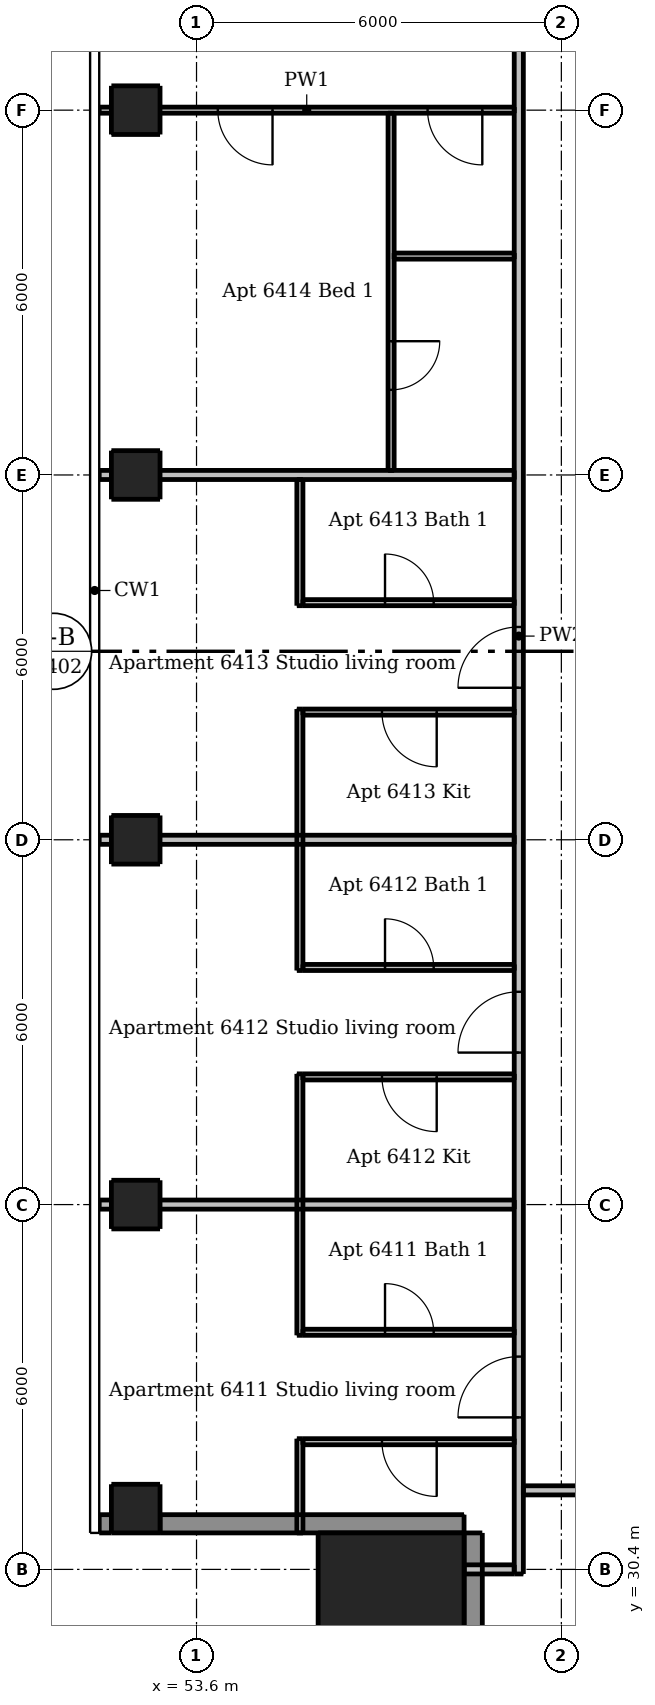
"""IFC4 building model, lengths in metres.
Left out: names, types, materials, properties, quantities, classifications, styles, units other than length and angle.
Written with IfcOpenShell. Run it as: python <this file> out.ifc"""

import sys

from ifc_helpers import new_model, si_unit, direction, frame, frame_2d, origin, origin_2d, place, context, subcontext, project, spatial, rectangle, extrude, element, fill, save


model = new_model("IFC4")
c1 = context("Model", 3, precision=1e-05, world=origin(), true_north=direction((0.0, 1.0)))
c2 = subcontext(c1, "Body", "Model", "MODEL_VIEW")
j1 = project(units=[si_unit("LENGTHUNIT", "METRE"), si_unit("PLANEANGLEUNIT", "RADIAN")], contexts=[c1])
p1 = place(None, origin())
s1 = spatial("IfcSite", under=j1, at=p1, CompositionType="ELEMENT")
p2 = place(p1, origin())
s2 = spatial("IfcBuilding", under=s1, at=p2, CompositionType="ELEMENT")
p3 = place(p2, frame((0.0, 0.0, 242.2)))
s3 = spatial("IfcBuildingStorey", under=s2, at=p3, CompositionType="ELEMENT", Elevation=242.2)
for number, where, z_axis, x_axis in (
    (1, (52.6, 31.4, 0.0), (0.0, 0.0, 1.0), (1.0, 0.0, 0.0)),
    (2, (52.6, 36.4, 0.0), (0.0, 0.0, 1.0), (1.0, 0.0, 0.0)),
    (3, (52.6, 42.4, 0.0), (0.0, 0.0, 1.0), (1.0, 0.0, 0.0)),
    (4, (52.6, 48.4, 0.0), (0.0, 0.0, 1.0), (1.0, 0.0, 0.0)),
    (5, (52.6, 54.4, 0.0), (0.0, 0.0, 1.0), (1.0, 0.0, 0.0)),
):
    element("IfcColumn", number, at=place(p3, frame(where, z_axis=z_axis, x_axis=x_axis)), inside=s3, PredefinedType="COLUMN", context=c2, shape_type="SweptSolid", body=[
        extrude(rectangle(XDim=0.8, YDim=0.8, at=origin_2d()), origin(), (0.0, 0.0, 1.0), 3.05),
    ])
p4 = place(p3, frame((56.8, 29.8, 0.0), z_axis=(0.0, 0.0, 1.0), x_axis=(1.0, 0.0, 0.0)))
e6 = element("IfcColumn", 6, at=p4, inside=s3, PredefinedType="COLUMN", context=c2, shape_type="SweptSolid", body=[
    extrude(rectangle(XDim=2.4, YDim=2.4, at=origin_2d()), origin(), (0.0, 0.0, 1.0), 3.3),
])
p5 = place(p3, frame((52.0, 31.15, 0.0), z_axis=(0.0, 0.0, 1.0), x_axis=(1.0, 0.0, 0.0)))
e7 = element("IfcWall", 7, at=p5, inside=s3, PredefinedType="SOLIDWALL", context=c2, shape_type="SweptSolid", body=[
    extrude(rectangle(XDim=0.2, YDim=0.3, at=frame_2d((0.1, 0.0))), origin(), (0.0, 0.0, 1.0), 3.05),
])
p6 = place(p3, frame((53.0, 31.15, 0.0), z_axis=(0.0, 0.0, 1.0), x_axis=(1.0, 0.0, 0.0)))
e8 = element("IfcWall", 8, at=p6, inside=s3, PredefinedType="SOLIDWALL", context=c2, shape_type="SweptSolid", body=[
    extrude(rectangle(XDim=5.0, YDim=0.3, at=frame_2d((2.5, 0.0))), origin(), (0.0, 0.0, 1.0), 3.05),
])
p7 = place(p3, frame((58.15, 31.0, 0.0), z_axis=(0.0, 0.0, 1.0), x_axis=(0.0, -1.0, 0.0)))
e9 = element("IfcWall", 9, at=p7, inside=s3, PredefinedType="SOLIDWALL", context=c2, shape_type="SweptSolid", body=[
    extrude(rectangle(XDim=6.0, YDim=0.3, at=frame_2d((3.0, 0.0))), origin(), (0.0, 0.0, 1.0), 3.05),
])
p8 = place(p7, frame((1.8, 0.0, 0.15)))
e10 = element("IfcOpeningElement", 10, at=p8, cuts=e9, PredefinedType="OPENING", context=c2, shape_type="SweptSolid", body=[
    extrude(rectangle(XDim=2.4, YDim=2.1, at=frame_2d((1.2, 1.05))), frame((0.0, 0.16, 0.0), z_axis=(0.0, -1.0, 0.0), x_axis=(1.0, 0.0, 0.0)), (0.0, 0.0, 1.0), 0.32),
])
p9 = place(p3, frame((55.3, 31.0, 0.0), z_axis=(0.0, 0.0, 1.0), x_axis=(0.0, 1.0, 0.0)))
e11 = element("IfcWall", 11, at=p9, inside=s3, PredefinedType="PARTITIONING", context=c2, shape_type="SweptSolid", body=[
    extrude(rectangle(XDim=1.55, YDim=0.1, at=frame_2d((0.775, 0.0))), origin(), (0.0, 0.0, 1.0), 3.05),
])
for number, where, z_axis, x_axis in (
    (12, (55.3, 34.25, 0.0), (0.0, 0.0, 1.0), (0.0, 1.0, 0.0)),
    (13, (55.3, 40.25, 0.0), (0.0, 0.0, 1.0), (0.0, 1.0, 0.0)),
):
    element("IfcWall", number, at=place(p3, frame(where, z_axis=z_axis, x_axis=x_axis)), inside=s3, PredefinedType="PARTITIONING", context=c2, shape_type="SweptSolid", body=[
        extrude(rectangle(XDim=4.3, YDim=0.1, at=frame_2d((2.15, 0.0))), origin(), (0.0, 0.0, 1.0), 3.05),
    ])
p10 = place(p3, frame((55.3, 46.25, 0.0), z_axis=(0.0, 0.0, 1.0), x_axis=(0.0, 1.0, 0.0)))
e14 = element("IfcWall", 14, at=p10, inside=s3, PredefinedType="PARTITIONING", context=c2, shape_type="SweptSolid", body=[
    extrude(rectangle(XDim=2.075, YDim=0.1, at=frame_2d((1.038, 0.0))), origin(), (0.0, 0.0, 1.0), 3.05),
])
p11 = place(p3, frame((56.8, 54.35, 0.0), z_axis=(0.0, 0.0, 1.0), x_axis=(0.0, -1.0, 0.0)))
e15 = element("IfcWall", 15, at=p11, inside=s3, PredefinedType="PARTITIONING", context=c2, shape_type="SweptSolid", body=[
    extrude(rectangle(XDim=5.875, YDim=0.1, at=frame_2d((2.938, 0.0))), origin(), (0.0, 0.0, 1.0), 3.05),
])
p12 = place(p11, frame((3.75, 0.0, 0.0)))
e16 = element("IfcOpeningElement", 16, at=p12, cuts=e15, PredefinedType="OPENING", context=c2, shape_type="SweptSolid", body=[
    extrude(rectangle(XDim=0.8, YDim=2.1, at=frame_2d((0.4, 1.05))), frame((0.0, 0.06, 0.0), z_axis=(0.0, -1.0, 0.0), x_axis=(1.0, 0.0, 0.0)), (0.0, 0.0, 1.0), 0.12),
])
p13 = place(p3, frame((58.825, 54.4, 0.0), z_axis=(0.0, 0.0, 1.0), x_axis=(-1.0, 0.0, 0.0)))
e17 = element("IfcWall", 17, at=p13, inside=s3, PredefinedType="PARTITIONING", context=c2, shape_type="SweptSolid", body=[
    extrude(rectangle(XDim=6.825, YDim=0.1, at=frame_2d((3.413, 0.0))), origin(), (0.0, 0.0, 1.0), 2.516),
])
p14 = place(p13, frame((0.525, 0.0, 0.0)))
e18 = element("IfcOpeningElement", 18, at=p14, cuts=e17, PredefinedType="OPENING", context=c2, shape_type="SweptSolid", body=[
    extrude(rectangle(XDim=0.9, YDim=2.1, at=frame_2d((0.45, 1.05))), frame((0.0, 0.06, 0.0), z_axis=(0.0, -1.0, 0.0), x_axis=(1.0, 0.0, 0.0)), (0.0, 0.0, 1.0), 0.12),
])
p15 = place(p13, frame((3.975, 0.0, 0.0)))
e19 = element("IfcOpeningElement", 19, at=p15, cuts=e17, PredefinedType="OPENING", context=c2, shape_type="SweptSolid", body=[
    extrude(rectangle(XDim=0.9, YDim=2.1, at=frame_2d((0.45, 1.05))), frame((0.0, 0.06, 0.0), z_axis=(0.0, -1.0, 0.0), x_axis=(1.0, 0.0, 0.0)), (0.0, 0.0, 1.0), 0.12),
])
p16 = place(p3, frame((56.85, 52.0, 0.0), z_axis=(0.0, 0.0, 1.0), x_axis=(1.0, 0.0, 0.0)))
e20 = element("IfcWall", 20, at=p16, inside=s3, PredefinedType="PARTITIONING", context=c2, shape_type="SweptSolid", body=[
    extrude(rectangle(XDim=1.975, YDim=0.1, at=frame_2d((0.987, 0.0))), origin(), (0.0, 0.0, 1.0), 3.05),
])
p17 = place(p3, frame((55.35, 46.3, 0.0), z_axis=(0.0, 0.0, 1.0), x_axis=(1.0, 0.0, 0.0)))
e21 = element("IfcWall", 21, at=p17, inside=s3, PredefinedType="PARTITIONING", context=c2, shape_type="SweptSolid", body=[
    extrude(rectangle(XDim=3.475, YDim=0.1, at=frame_2d((1.737, 0.0))), origin(), (0.0, 0.0, 1.0), 3.05),
])
p18 = place(p17, frame((1.35, 0.0, 0.0)))
e22 = element("IfcOpeningElement", 22, at=p18, cuts=e21, PredefinedType="OPENING", context=c2, shape_type="SweptSolid", body=[
    extrude(rectangle(XDim=0.8, YDim=2.1, at=frame_2d((0.4, 1.05))), frame((0.0, 0.06, 0.0), z_axis=(0.0, -1.0, 0.0), x_axis=(1.0, 0.0, 0.0)), (0.0, 0.0, 1.0), 0.12),
])
p19 = place(p3, frame((58.825, 44.5, 0.0), z_axis=(0.0, 0.0, 1.0), x_axis=(-1.0, 0.0, 0.0)))
e23 = element("IfcWall", 23, at=p19, inside=s3, PredefinedType="PARTITIONING", context=c2, shape_type="SweptSolid", body=[
    extrude(rectangle(XDim=3.475, YDim=0.1, at=frame_2d((1.737, 0.0))), origin(), (0.0, 0.0, 1.0), 3.05),
])
p20 = place(p19, frame((1.275, 0.0, 0.0)))
e24 = element("IfcOpeningElement", 24, at=p20, cuts=e23, PredefinedType="OPENING", context=c2, shape_type="SweptSolid", body=[
    extrude(rectangle(XDim=0.9, YDim=2.1, at=frame_2d((0.45, 1.05))), frame((0.0, 0.06, 0.0), z_axis=(0.0, -1.0, 0.0), x_axis=(1.0, 0.0, 0.0)), (0.0, 0.0, 1.0), 0.12),
])
p21 = place(p3, frame((55.35, 40.3, 0.0), z_axis=(0.0, 0.0, 1.0), x_axis=(1.0, 0.0, 0.0)))
e25 = element("IfcWall", 25, at=p21, inside=s3, PredefinedType="PARTITIONING", context=c2, shape_type="SweptSolid", body=[
    extrude(rectangle(XDim=3.475, YDim=0.1, at=frame_2d((1.737, 0.0))), origin(), (0.0, 0.0, 1.0), 3.05),
])
p22 = place(p21, frame((1.35, 0.0, 0.0)))
e26 = element("IfcOpeningElement", 26, at=p22, cuts=e25, PredefinedType="OPENING", context=c2, shape_type="SweptSolid", body=[
    extrude(rectangle(XDim=0.8, YDim=2.1, at=frame_2d((0.4, 1.05))), frame((0.0, 0.06, 0.0), z_axis=(0.0, -1.0, 0.0), x_axis=(1.0, 0.0, 0.0)), (0.0, 0.0, 1.0), 0.12),
])
p23 = place(p3, frame((58.825, 38.5, 0.0), z_axis=(0.0, 0.0, 1.0), x_axis=(-1.0, 0.0, 0.0)))
e27 = element("IfcWall", 27, at=p23, inside=s3, PredefinedType="PARTITIONING", context=c2, shape_type="SweptSolid", body=[
    extrude(rectangle(XDim=3.475, YDim=0.1, at=frame_2d((1.737, 0.0))), origin(), (0.0, 0.0, 1.0), 3.05),
])
p24 = place(p23, frame((1.275, 0.0, 0.0)))
e28 = element("IfcOpeningElement", 28, at=p24, cuts=e27, PredefinedType="OPENING", context=c2, shape_type="SweptSolid", body=[
    extrude(rectangle(XDim=0.9, YDim=2.1, at=frame_2d((0.45, 1.05))), frame((0.0, 0.06, 0.0), z_axis=(0.0, -1.0, 0.0), x_axis=(1.0, 0.0, 0.0)), (0.0, 0.0, 1.0), 0.12),
])
p25 = place(p3, frame((55.35, 34.3, 0.0), z_axis=(0.0, 0.0, 1.0), x_axis=(1.0, 0.0, 0.0)))
e29 = element("IfcWall", 29, at=p25, inside=s3, PredefinedType="PARTITIONING", context=c2, shape_type="SweptSolid", body=[
    extrude(rectangle(XDim=3.475, YDim=0.1, at=frame_2d((1.737, 0.0))), origin(), (0.0, 0.0, 1.0), 3.05),
])
p26 = place(p25, frame((1.35, 0.0, 0.0)))
e30 = element("IfcOpeningElement", 30, at=p26, cuts=e29, PredefinedType="OPENING", context=c2, shape_type="SweptSolid", body=[
    extrude(rectangle(XDim=0.8, YDim=2.1, at=frame_2d((0.4, 1.05))), frame((0.0, 0.06, 0.0), z_axis=(0.0, -1.0, 0.0), x_axis=(1.0, 0.0, 0.0)), (0.0, 0.0, 1.0), 0.12),
])
p27 = place(p3, frame((58.825, 32.5, 0.0), z_axis=(0.0, 0.0, 1.0), x_axis=(-1.0, 0.0, 0.0)))
e31 = element("IfcWall", 31, at=p27, inside=s3, PredefinedType="PARTITIONING", context=c2, shape_type="SweptSolid", body=[
    extrude(rectangle(XDim=3.475, YDim=0.1, at=frame_2d((1.737, 0.0))), origin(), (0.0, 0.0, 1.0), 3.05),
])
p28 = place(p27, frame((1.275, 0.0, 0.0)))
e32 = element("IfcOpeningElement", 32, at=p28, cuts=e31, PredefinedType="OPENING", context=c2, shape_type="SweptSolid", body=[
    extrude(rectangle(XDim=0.9, YDim=2.1, at=frame_2d((0.45, 1.05))), frame((0.0, 0.06, 0.0), z_axis=(0.0, -1.0, 0.0), x_axis=(1.0, 0.0, 0.0)), (0.0, 0.0, 1.0), 0.12),
])
p29 = place(p3, frame((58.9, 30.325, 0.0), z_axis=(0.0, 0.0, 1.0), x_axis=(0.0, 1.0, 0.0)))
e33 = element("IfcWall", 33, at=p29, inside=s3, PredefinedType="PARTITIONING", context=c2, shape_type="SweptSolid", body=[
    extrude(rectangle(XDim=30.85, YDim=0.15, at=frame_2d((15.425, 0.0))), origin(), (0.0, 0.0, 1.0), 3.05),
])
p30 = place(p29, frame((2.575, 0.0, 0.0)))
e34 = element("IfcOpeningElement", 34, at=p30, cuts=e33, PredefinedType="OPENING", context=c2, shape_type="SweptSolid", body=[
    extrude(rectangle(XDim=1.0, YDim=2.1, at=frame_2d((0.5, 1.05))), frame((0.0, 0.085, 0.0), z_axis=(0.0, -1.0, 0.0), x_axis=(1.0, 0.0, 0.0)), (0.0, 0.0, 1.0), 0.17),
])
p31 = place(p29, frame((8.575, 0.0, 0.0)))
e35 = element("IfcOpeningElement", 35, at=p31, cuts=e33, PredefinedType="OPENING", context=c2, shape_type="SweptSolid", body=[
    extrude(rectangle(XDim=1.0, YDim=2.1, at=frame_2d((0.5, 1.05))), frame((0.0, 0.085, 0.0), z_axis=(0.0, -1.0, 0.0), x_axis=(1.0, 0.0, 0.0)), (0.0, 0.0, 1.0), 0.17),
])
p32 = place(p29, frame((14.575, 0.0, 0.0)))
e36 = element("IfcOpeningElement", 36, at=p32, cuts=e33, PredefinedType="OPENING", context=c2, shape_type="SweptSolid", body=[
    extrude(rectangle(XDim=1.0, YDim=2.1, at=frame_2d((0.5, 1.05))), frame((0.0, 0.085, 0.0), z_axis=(0.0, -1.0, 0.0), x_axis=(1.0, 0.0, 0.0)), (0.0, 0.0, 1.0), 0.17),
])
p33 = place(p29, frame((26.925, 0.0, 0.0)))
e37 = element("IfcOpeningElement", 37, at=p33, cuts=e33, PredefinedType="OPENING", context=c2, shape_type="SweptSolid", body=[
    extrude(rectangle(XDim=1.0, YDim=2.1, at=frame_2d((0.5, 1.05))), frame((0.0, 0.085, 0.0), z_axis=(0.0, -1.0, 0.0), x_axis=(1.0, 0.0, 0.0)), (0.0, 0.0, 1.0), 0.17),
])
for number, where, z_axis, x_axis in (
    (38, (52.0, 48.4, 0.0), (0.0, 0.0, 1.0), (1.0, 0.0, 0.0)),
    (39, (52.0, 42.4, 0.0), (0.0, 0.0, 1.0), (1.0, 0.0, 0.0)),
    (40, (52.0, 36.4, 0.0), (0.0, 0.0, 1.0), (1.0, 0.0, 0.0)),
):
    element("IfcWall", number, at=place(p3, frame(where, z_axis=z_axis, x_axis=x_axis)), inside=s3, PredefinedType="PARTITIONING", context=c2, shape_type="SweptSolid", body=[
        extrude(rectangle(XDim=6.825, YDim=0.15, at=frame_2d((3.413, 0.0))), origin(), (0.0, 0.0, 1.0), 2.516),
    ])
p34 = place(p3, frame((89.525, 31.7, 0.0), z_axis=(0.0, 0.0, 1.0), x_axis=(-1.0, 0.0, 0.0)))
e41 = element("IfcWall", 41, at=p34, inside=s3, PredefinedType="PARTITIONING", context=c2, shape_type="SweptSolid", body=[
    extrude(rectangle(XDim=30.55, YDim=0.15, at=frame_2d((15.275, 0.0))), origin(), (0.0, 0.0, 1.0), 3.05),
])
p35 = place(p34, frame((26.775, 0.0, 0.0)))
e42 = element("IfcOpeningElement", 42, at=p35, cuts=e41, PredefinedType="OPENING", context=c2, shape_type="SweptSolid", body=[
    extrude(rectangle(XDim=1.0, YDim=2.1, at=frame_2d((0.5, 1.05))), frame((0.0, 0.085, 0.0), z_axis=(0.0, -1.0, 0.0), x_axis=(1.0, 0.0, 0.0)), (0.0, 0.0, 1.0), 0.17),
])
p36 = place(p34, frame((14.425, 0.0, 0.0)))
e43 = element("IfcOpeningElement", 43, at=p36, cuts=e41, PredefinedType="OPENING", context=c2, shape_type="SweptSolid", body=[
    extrude(rectangle(XDim=1.0, YDim=2.1, at=frame_2d((0.5, 1.05))), frame((0.0, 0.085, 0.0), z_axis=(0.0, -1.0, 0.0), x_axis=(1.0, 0.0, 0.0)), (0.0, 0.0, 1.0), 0.17),
])
p37 = place(p34, frame((6.962, 0.0, 0.0)))
e44 = element("IfcOpeningElement", 44, at=p37, cuts=e41, PredefinedType="OPENING", context=c2, shape_type="SweptSolid", body=[
    extrude(rectangle(XDim=1.0, YDim=2.1, at=frame_2d((0.5, 1.05))), frame((0.0, 0.085, 0.0), z_axis=(0.0, -1.0, 0.0), x_axis=(1.0, 0.0, 0.0)), (0.0, 0.0, 1.0), 0.17),
])
p38 = place(p3, frame((58.0, 30.4, 0.0), z_axis=(0.0, 0.0, 1.0), x_axis=(1.0, 0.0, 0.0)))
e45 = element("IfcWall", 45, at=p38, inside=s3, PredefinedType="PARTITIONING", context=c2, shape_type="SweptSolid", body=[
    extrude(rectangle(XDim=0.825, YDim=0.15, at=frame_2d((0.413, 0.0))), origin(), (0.0, 0.0, 1.0), 3.05),
])
p39 = place(p30, origin())
e46 = element("IfcDoor", 46, at=p39, inside=s3, OperationType="SINGLE_SWING_LEFT", PredefinedType="DOOR", context=c2, shape_type="SweptSolid", body=[
    extrude(rectangle(XDim=1.0, YDim=2.1, at=frame_2d((0.5, 1.05))), frame((0.0, 0.025, 0.0), z_axis=(0.0, -1.0, 0.0), x_axis=(1.0, 0.0, 0.0)), (0.0, 0.0, 1.0), 0.05),
])
fill(e34, e46)
p40 = place(p28, origin())
e47 = element("IfcDoor", 47, at=p40, inside=s3, OperationType="SINGLE_SWING_LEFT", PredefinedType="DOOR", context=c2, shape_type="SweptSolid", body=[
    extrude(rectangle(XDim=0.9, YDim=2.1, at=frame_2d((0.45, 1.05))), frame((0.0, 0.025, 0.0), z_axis=(0.0, -1.0, 0.0), x_axis=(1.0, 0.0, 0.0)), (0.0, 0.0, 1.0), 0.05),
])
fill(e32, e47)
p41 = place(p26, origin())
e48 = element("IfcDoor", 48, at=p41, inside=s3, OperationType="SINGLE_SWING_LEFT", PredefinedType="DOOR", context=c2, shape_type="SweptSolid", body=[
    extrude(rectangle(XDim=0.8, YDim=2.1, at=frame_2d((0.4, 1.05))), frame((0.0, 0.025, 0.0), z_axis=(0.0, -1.0, 0.0), x_axis=(1.0, 0.0, 0.0)), (0.0, 0.0, 1.0), 0.05),
])
fill(e30, e48)
p42 = place(p31, origin())
e49 = element("IfcDoor", 49, at=p42, inside=s3, OperationType="SINGLE_SWING_LEFT", PredefinedType="DOOR", context=c2, shape_type="SweptSolid", body=[
    extrude(rectangle(XDim=1.0, YDim=2.1, at=frame_2d((0.5, 1.05))), frame((0.0, 0.025, 0.0), z_axis=(0.0, -1.0, 0.0), x_axis=(1.0, 0.0, 0.0)), (0.0, 0.0, 1.0), 0.05),
])
fill(e35, e49)
p43 = place(p24, origin())
e50 = element("IfcDoor", 50, at=p43, inside=s3, OperationType="SINGLE_SWING_LEFT", PredefinedType="DOOR", context=c2, shape_type="SweptSolid", body=[
    extrude(rectangle(XDim=0.9, YDim=2.1, at=frame_2d((0.45, 1.05))), frame((0.0, 0.025, 0.0), z_axis=(0.0, -1.0, 0.0), x_axis=(1.0, 0.0, 0.0)), (0.0, 0.0, 1.0), 0.05),
])
fill(e28, e50)
p44 = place(p22, origin())
e51 = element("IfcDoor", 51, at=p44, inside=s3, OperationType="SINGLE_SWING_LEFT", PredefinedType="DOOR", context=c2, shape_type="SweptSolid", body=[
    extrude(rectangle(XDim=0.8, YDim=2.1, at=frame_2d((0.4, 1.05))), frame((0.0, 0.025, 0.0), z_axis=(0.0, -1.0, 0.0), x_axis=(1.0, 0.0, 0.0)), (0.0, 0.0, 1.0), 0.05),
])
fill(e26, e51)
p45 = place(p32, origin())
e52 = element("IfcDoor", 52, at=p45, inside=s3, OperationType="SINGLE_SWING_LEFT", PredefinedType="DOOR", context=c2, shape_type="SweptSolid", body=[
    extrude(rectangle(XDim=1.0, YDim=2.1, at=frame_2d((0.5, 1.05))), frame((0.0, 0.025, 0.0), z_axis=(0.0, -1.0, 0.0), x_axis=(1.0, 0.0, 0.0)), (0.0, 0.0, 1.0), 0.05),
])
fill(e36, e52)
p46 = place(p20, origin())
e53 = element("IfcDoor", 53, at=p46, inside=s3, OperationType="SINGLE_SWING_LEFT", PredefinedType="DOOR", context=c2, shape_type="SweptSolid", body=[
    extrude(rectangle(XDim=0.9, YDim=2.1, at=frame_2d((0.45, 1.05))), frame((0.0, 0.025, 0.0), z_axis=(0.0, -1.0, 0.0), x_axis=(1.0, 0.0, 0.0)), (0.0, 0.0, 1.0), 0.05),
])
fill(e24, e53)
p47 = place(p18, origin())
e54 = element("IfcDoor", 54, at=p47, inside=s3, OperationType="SINGLE_SWING_LEFT", PredefinedType="DOOR", context=c2, shape_type="SweptSolid", body=[
    extrude(rectangle(XDim=0.8, YDim=2.1, at=frame_2d((0.4, 1.05))), frame((0.0, 0.025, 0.0), z_axis=(0.0, -1.0, 0.0), x_axis=(1.0, 0.0, 0.0)), (0.0, 0.0, 1.0), 0.05),
])
fill(e22, e54)
p48 = place(p14, origin())
e55 = element("IfcDoor", 55, at=p48, inside=s3, OperationType="SINGLE_SWING_LEFT", PredefinedType="DOOR", context=c2, shape_type="SweptSolid", body=[
    extrude(rectangle(XDim=0.9, YDim=2.1, at=frame_2d((0.45, 1.05))), frame((0.0, 0.025, 0.0), z_axis=(0.0, -1.0, 0.0), x_axis=(1.0, 0.0, 0.0)), (0.0, 0.0, 1.0), 0.05),
])
fill(e18, e55)
p49 = place(p15, origin())
e56 = element("IfcDoor", 56, at=p49, inside=s3, OperationType="SINGLE_SWING_LEFT", PredefinedType="DOOR", context=c2, shape_type="SweptSolid", body=[
    extrude(rectangle(XDim=0.9, YDim=2.1, at=frame_2d((0.45, 1.05))), frame((0.0, 0.025, 0.0), z_axis=(0.0, -1.0, 0.0), x_axis=(1.0, 0.0, 0.0)), (0.0, 0.0, 1.0), 0.05),
])
fill(e19, e56)
p50 = place(p12, origin())
e57 = element("IfcDoor", 57, at=p50, inside=s3, OperationType="SINGLE_SWING_LEFT", PredefinedType="DOOR", context=c2, shape_type="SweptSolid", body=[
    extrude(rectangle(XDim=0.8, YDim=2.1, at=frame_2d((0.4, 1.05))), frame((0.0, 0.025, 0.0), z_axis=(0.0, -1.0, 0.0), x_axis=(1.0, 0.0, 0.0)), (0.0, 0.0, 1.0), 0.05),
])
fill(e16, e57)
save(model, sys.argv[1])
